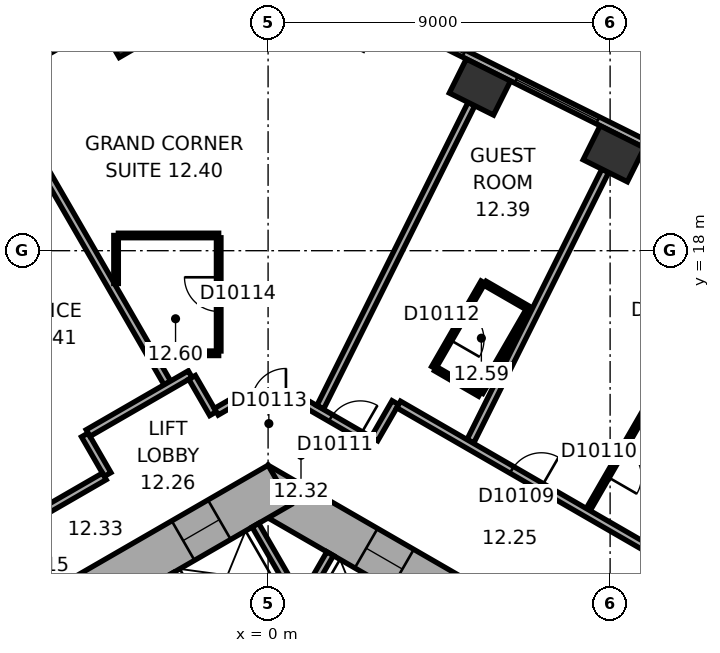
"""IFC4 building model, lengths in metres.
Left out: names, types, materials, properties, quantities, classifications, styles, units other than length and angle.
Written with IfcOpenShell. Run it as: python <this file> out.ifc"""

import sys

from ifc_helpers import new_model, si_unit, direction, frame, frame_2d, origin, origin_2d, place, context, subcontext, project, spatial, rectangle, extrude, element, fill, save


model = new_model("IFC4")
c1 = context("Model", 3, precision=1e-05, world=origin(), true_north=direction((0.0, 1.0)))
c2 = subcontext(c1, "Body", "Model", "MODEL_VIEW")
j1 = project(units=[si_unit("LENGTHUNIT", "METRE"), si_unit("PLANEANGLEUNIT", "RADIAN")], contexts=[c1])
p1 = place(None, origin())
s1 = spatial("IfcSite", under=j1, at=p1, CompositionType="ELEMENT")
p2 = place(p1, origin())
s2 = spatial("IfcBuilding", under=s1, at=p2, CompositionType="ELEMENT")
p3 = place(p2, frame((0.0, 0.0, 60.5)))
s3 = spatial("IfcBuildingStorey", under=s2, at=p3, CompositionType="ELEMENT", Elevation=60.5)
for number, where, z_axis, x_axis in (
    (1, (9.095, 20.551, 0.0), (0.0, 0.0, 1.0), (-0.895, 0.446, 0.0)),
    (2, (5.574, 22.306, 0.0), (0.0, 0.0, 1.0), (-0.895, 0.446, 0.0)),
):
    element("IfcColumn", number, at=place(p3, frame(where, z_axis=z_axis, x_axis=x_axis)), inside=s3, PredefinedType="COLUMN", context=c2, shape_type="SweptSolid", body=[
        extrude(rectangle(XDim=1.3, YDim=1.0, at=origin_2d()), origin(), (0.0, 0.0, 1.0), 3.3),
    ])
p4 = place(p3, frame((-3.518, 23.892, 0.0), z_axis=(0.0, 0.0, 1.0), x_axis=(-0.866025403784, -0.5, 0.0)))
e3 = element("IfcColumn", 3, at=p4, inside=s3, PredefinedType="COLUMN", context=c2, shape_type="SweptSolid", body=[
    extrude(rectangle(XDim=1.5, YDim=1.0, at=origin_2d()), origin(), (0.0, 0.0, 1.0), 3.3),
])
p5 = place(p3, frame((10.4, 5.658, 0.0), z_axis=(0.0, 0.0, 1.0), x_axis=(-0.866021384402, 0.500006961711, 0.0)))
e4 = element("IfcWall", 4, at=p5, inside=s3, PredefinedType="SHEAR", context=c2, shape_type="SweptSolid", body=[
    extrude(rectangle(XDim=12.355, YDim=1.2, at=frame_2d((6.178, 0.0))), origin(), (0.0, 0.0, 1.0), 3.3),
])
p6 = place(p5, frame((2.728, 0.0, 0.0)))
e5 = element("IfcOpeningElement", 5, at=p6, cuts=e4, PredefinedType="OPENING", context=c2, shape_type="SweptSolid", body=[
    extrude(rectangle(XDim=1.1, YDim=2.1, at=frame_2d((0.55, 1.05))), frame((0.0, 0.61, 0.0), z_axis=(0.0, -1.0, 0.0), x_axis=(1.0, 0.0, 0.0)), (0.0, 0.0, 1.0), 1.22),
])
p7 = place(p5, frame((5.328, 0.0, 0.0)))
e6 = element("IfcOpeningElement", 6, at=p7, cuts=e4, PredefinedType="OPENING", context=c2, shape_type="SweptSolid", body=[
    extrude(rectangle(XDim=1.1, YDim=2.1, at=frame_2d((0.55, 1.05))), frame((0.0, 0.61, 0.0), z_axis=(0.0, -1.0, 0.0), x_axis=(1.0, 0.0, 0.0)), (0.0, 0.0, 1.0), 1.22),
])
p8 = place(p5, frame((7.928, 0.0, 0.0)))
e7 = element("IfcOpeningElement", 7, at=p8, cuts=e4, PredefinedType="OPENING", context=c2, shape_type="SweptSolid", body=[
    extrude(rectangle(XDim=1.1, YDim=2.1, at=frame_2d((0.55, 1.05))), frame((0.0, 0.61, 0.0), z_axis=(0.0, -1.0, 0.0), x_axis=(1.0, 0.0, 0.0)), (0.0, 0.0, 1.0), 1.22),
])
p9 = place(p3, frame((0.3, 11.836, 0.0), z_axis=(0.0, 0.0, 1.0), x_axis=(-0.866021384402, -0.500006961711, 0.0)))
e8 = element("IfcWall", 8, at=p9, inside=s3, PredefinedType="SHEAR", context=c2, shape_type="SweptSolid", body=[
    extrude(rectangle(XDim=12.355, YDim=1.2, at=frame_2d((6.178, 0.0))), origin(), (0.0, 0.0, 1.0), 3.3),
])
p10 = place(p9, frame((6.378, 0.0, 0.0)))
e9 = element("IfcOpeningElement", 9, at=p10, cuts=e8, PredefinedType="OPENING", context=c2, shape_type="SweptSolid", body=[
    extrude(rectangle(XDim=1.5, YDim=2.1, at=frame_2d((0.75, 1.05))), frame((0.0, 0.61, 0.0), z_axis=(0.0, -1.0, 0.0), x_axis=(1.0, 0.0, 0.0)), (0.0, 0.0, 1.0), 1.22),
])
p11 = place(p9, frame((1.828, 0.0, 0.0)))
e10 = element("IfcOpeningElement", 10, at=p11, cuts=e8, PredefinedType="OPENING", context=c2, shape_type="SweptSolid", body=[
    extrude(rectangle(XDim=1.1, YDim=2.1, at=frame_2d((0.55, 1.05))), frame((0.0, 0.61, 0.0), z_axis=(0.0, -1.0, 0.0), x_axis=(1.0, 0.0, 0.0)), (0.0, 0.0, 1.0), 1.22),
])
p12 = place(p3, frame((20.63, 15.47, 0.0), z_axis=(0.0, 0.0, 1.0), x_axis=(-0.894934518609, 0.446197498203, 0.0)))
e11 = element("IfcWall", 11, at=p12, inside=s3, PredefinedType="STANDARD", context=c2, shape_type="SweptSolid", body=[
    extrude(rectangle(XDim=21.246, YDim=0.2, at=frame_2d((10.623, 0.0))), origin(), (0.0, 0.0, 1.0), 3.3),
])
p13 = place(p12, frame((1.553, 0.0, 0.8)))
e12 = element("IfcOpeningElement", 12, at=p13, cuts=e11, PredefinedType="OPENING", context=c2, shape_type="SweptSolid", body=[
    extrude(rectangle(XDim=2.4, YDim=1.7, at=frame_2d((1.2, 0.85))), frame((0.0, 0.11, 0.0), z_axis=(0.0, -1.0, 0.0), x_axis=(1.0, 0.0, 0.0)), (0.0, 0.0, 1.0), 0.22),
])
p14 = place(p12, frame((5.488, 0.0, 0.8)))
e13 = element("IfcOpeningElement", 13, at=p14, cuts=e11, PredefinedType="OPENING", context=c2, shape_type="SweptSolid", body=[
    extrude(rectangle(XDim=2.4, YDim=1.7, at=frame_2d((1.2, 0.85))), frame((0.0, 0.11, 0.0), z_axis=(0.0, -1.0, 0.0), x_axis=(1.0, 0.0, 0.0)), (0.0, 0.0, 1.0), 0.22),
])
p15 = place(p12, frame((9.422, 0.0, 0.8)))
e14 = element("IfcOpeningElement", 14, at=p15, cuts=e11, PredefinedType="OPENING", context=c2, shape_type="SweptSolid", body=[
    extrude(rectangle(XDim=2.4, YDim=1.7, at=frame_2d((1.2, 0.85))), frame((0.0, 0.11, 0.0), z_axis=(0.0, -1.0, 0.0), x_axis=(1.0, 0.0, 0.0)), (0.0, 0.0, 1.0), 0.22),
])
p16 = place(p12, frame((13.357, 0.0, 0.8)))
e15 = element("IfcOpeningElement", 15, at=p16, cuts=e11, PredefinedType="OPENING", context=c2, shape_type="SweptSolid", body=[
    extrude(rectangle(XDim=2.4, YDim=1.7, at=frame_2d((1.2, 0.85))), frame((0.0, 0.11, 0.0), z_axis=(0.0, -1.0, 0.0), x_axis=(1.0, 0.0, 0.0)), (0.0, 0.0, 1.0), 0.22),
])
p17 = place(p12, frame((17.292, 0.0, 0.8)))
e16 = element("IfcOpeningElement", 16, at=p17, cuts=e11, PredefinedType="OPENING", context=c2, shape_type="SweptSolid", body=[
    extrude(rectangle(XDim=2.4, YDim=1.7, at=frame_2d((1.2, 0.85))), frame((0.0, 0.11, 0.0), z_axis=(0.0, -1.0, 0.0), x_axis=(1.0, 0.0, 0.0)), (0.0, 0.0, 1.0), 0.22),
])
p18 = place(p3, frame((-3.136, 24.805, 0.0), z_axis=(0.0, 0.0, 1.0), x_axis=(-0.866028291626, -0.499994998079, 0.0)))
e17 = element("IfcWall", 17, at=p18, inside=s3, PredefinedType="STANDARD", context=c2, shape_type="SweptSolid", body=[
    extrude(rectangle(XDim=21.246, YDim=0.2, at=frame_2d((10.623, 0.0))), origin(), (0.0, 0.0, 1.0), 3.3),
])
p19 = place(p18, frame((1.555, 0.0, 0.8)))
e18 = element("IfcOpeningElement", 18, at=p19, cuts=e17, PredefinedType="OPENING", context=c2, shape_type="SweptSolid", body=[
    extrude(rectangle(XDim=2.4, YDim=1.7, at=frame_2d((1.2, 0.85))), frame((0.0, 0.11, 0.0), z_axis=(0.0, -1.0, 0.0), x_axis=(1.0, 0.0, 0.0)), (0.0, 0.0, 1.0), 0.22),
])
p20 = place(p18, frame((5.489, 0.0, 0.8)))
e19 = element("IfcOpeningElement", 19, at=p20, cuts=e17, PredefinedType="OPENING", context=c2, shape_type="SweptSolid", body=[
    extrude(rectangle(XDim=2.4, YDim=1.7, at=frame_2d((1.2, 0.85))), frame((0.0, 0.11, 0.0), z_axis=(0.0, -1.0, 0.0), x_axis=(1.0, 0.0, 0.0)), (0.0, 0.0, 1.0), 0.22),
])
p21 = place(p18, frame((9.424, 0.0, 0.8)))
e20 = element("IfcOpeningElement", 20, at=p21, cuts=e17, PredefinedType="OPENING", context=c2, shape_type="SweptSolid", body=[
    extrude(rectangle(XDim=2.4, YDim=1.7, at=frame_2d((1.2, 0.85))), frame((0.0, 0.11, 0.0), z_axis=(0.0, -1.0, 0.0), x_axis=(1.0, 0.0, 0.0)), (0.0, 0.0, 1.0), 0.22),
])
p22 = place(p18, frame((13.358, 0.0, 0.8)))
e21 = element("IfcOpeningElement", 21, at=p22, cuts=e17, PredefinedType="OPENING", context=c2, shape_type="SweptSolid", body=[
    extrude(rectangle(XDim=2.4, YDim=1.7, at=frame_2d((1.2, 0.85))), frame((0.0, 0.11, 0.0), z_axis=(0.0, -1.0, 0.0), x_axis=(1.0, 0.0, 0.0)), (0.0, 0.0, 1.0), 0.22),
])
p23 = place(p18, frame((17.293, 0.0, 0.8)))
e22 = element("IfcOpeningElement", 22, at=p23, cuts=e17, PredefinedType="OPENING", context=c2, shape_type="SweptSolid", body=[
    extrude(rectangle(XDim=2.4, YDim=1.7, at=frame_2d((1.2, 0.85))), frame((0.0, 0.11, 0.0), z_axis=(0.0, -1.0, 0.0), x_axis=(1.0, 0.0, 0.0)), (0.0, 0.0, 1.0), 0.22),
])
p24 = place(p3, frame((0.532, 8.122, 0.0), z_axis=(0.0, 0.0, 1.0), x_axis=(0.500077893725, 0.86598042715, 0.0)))
e23 = element("IfcWall", 23, at=p24, inside=s3, PredefinedType="PARTITIONING", context=c2, shape_type="SweptSolid", body=[
    extrude(rectangle(XDim=2.2, YDim=0.2, at=frame_2d((1.1, 0.0))), origin(), (0.0, 0.0, 1.0), 3.05),
])
p25 = place(p3, frame((0.767, 8.872, 0.0), z_axis=(0.0, 0.0, 1.0), x_axis=(-0.499994660107, 0.866028486751, 0.0)))
e24 = element("IfcWall", 24, at=p25, inside=s3, PredefinedType="PARTITIONING", context=c2, shape_type="SweptSolid", body=[
    extrude(rectangle(XDim=2.2, YDim=0.2, at=frame_2d((1.1, 0.0))), origin(), (0.0, 0.0, 1.0), 3.05),
])
p26 = place(p3, frame((-1.485, 7.572, 0.0), z_axis=(0.0, 0.0, 1.0), x_axis=(-0.50002983664, 0.866008176907, 0.0)))
e25 = element("IfcWall", 25, at=p26, inside=s3, PredefinedType="PARTITIONING", context=c2, shape_type="SweptSolid", body=[
    extrude(rectangle(XDim=2.2, YDim=0.2, at=frame_2d((1.1, 0.0))), origin(), (0.0, 0.0, 1.0), 3.05),
])
p27 = place(p3, frame((-6.676, 21.492, 0.0), z_axis=(0.0, 0.0, 1.0), x_axis=(0.500011263043, -0.866018900966, 0.0)))
e26 = element("IfcWall", 26, at=p27, inside=s3, PredefinedType="PARTITIONING", context=c2, shape_type="SweptSolid", body=[
    extrude(rectangle(XDim=8.049, YDim=0.2, at=frame_2d((4.024, 0.0))), origin(), (0.0, 0.0, 1.0), 3.05),
])
p28 = place(p3, frame((-4.823, 13.152, 0.0), z_axis=(0.0, 0.0, 1.0), x_axis=(0.499986357472, -0.866033280158, 0.0)))
e27 = element("IfcWall", 27, at=p28, inside=s3, PredefinedType="PARTITIONING", context=c2, shape_type="SweptSolid", body=[
    extrude(rectangle(XDim=1.201, YDim=0.2, at=frame_2d((0.601, 0.0))), origin(), (0.0, 0.0, 1.0), 3.05),
])
p29 = place(p3, frame((-4.309, 12.061, 0.0), z_axis=(0.0, 0.0, 1.0), x_axis=(-0.866020679205, -0.500008183122, 0.0)))
e28 = element("IfcWall", 28, at=p29, inside=s3, PredefinedType="PARTITIONING", context=c2, shape_type="SweptSolid", body=[
    extrude(rectangle(XDim=5.104, YDim=0.2, at=frame_2d((2.552, 0.0))), origin(), (0.0, 0.0, 1.0), 3.05),
])
p30 = place(p29, frame((2.052, 0.0, 0.0)))
e29 = element("IfcOpeningElement", 29, at=p30, cuts=e28, PredefinedType="OPENING", context=c2, shape_type="SweptSolid", body=[
    extrude(rectangle(XDim=1.0, YDim=2.1, at=frame_2d((0.5, 1.05))), frame((0.0, 0.11, 0.0), z_axis=(0.0, -1.0, 0.0), x_axis=(1.0, 0.0, 0.0)), (0.0, 0.0, 1.0), 0.22),
])
p31 = place(p3, frame((-4.0, 17.137, 0.0), z_axis=(0.0, 0.0, 1.0), x_axis=(0.0, 1.0, 0.0)))
e30 = element("IfcWall", 30, at=p31, inside=s3, PredefinedType="PARTITIONING", context=c2, shape_type="SweptSolid", body=[
    extrude(rectangle(XDim=1.263, YDim=0.12, at=frame_2d((0.632, 0.0))), origin(), (0.0, 0.0, 1.0), 3.05),
])
p32 = place(p3, frame((-3.94, 18.401, 0.0), z_axis=(0.0, 0.0, 1.0), x_axis=(1.0, 0.0, 0.0)))
e31 = element("IfcWall", 31, at=p32, inside=s3, PredefinedType="PARTITIONING", context=c2, shape_type="SweptSolid", body=[
    extrude(rectangle(XDim=2.64, YDim=0.12, at=frame_2d((1.32, 0.0))), origin(), (0.0, 0.0, 1.0), 3.05),
])
p33 = place(p3, frame((-2.05, 14.752, 0.0), z_axis=(0.0, 0.0, 1.0), x_axis=(-0.866030936828, -0.499990416364, 0.0)))
e32 = element("IfcWall", 32, at=p33, inside=s3, PredefinedType="PARTITIONING", context=c2, shape_type="SweptSolid", body=[
    extrude(rectangle(XDim=3.102, YDim=0.2, at=frame_2d((1.551, 0.0))), origin(), (0.0, 0.0, 1.0), 3.05),
])
p34 = place(p3, frame((-1.449, 13.712, 0.0), z_axis=(0.0, 0.0, 1.0), x_axis=(-0.499978356969, 0.866037899034, 0.0)))
e33 = element("IfcWall", 33, at=p34, inside=s3, PredefinedType="PARTITIONING", context=c2, shape_type="SweptSolid", body=[
    extrude(rectangle(XDim=1.101, YDim=0.2, at=frame_2d((0.551, 0.0))), origin(), (0.0, 0.0, 1.0), 3.05),
])
p35 = place(p3, frame((-1.3, 15.301, 0.0), z_axis=(0.0, 0.0, 1.0), x_axis=(-1.0, 0.0, 0.0)))
e34 = element("IfcWall", 34, at=p35, inside=s3, PredefinedType="PARTITIONING", context=c2, shape_type="SweptSolid", body=[
    extrude(rectangle(XDim=1.661, YDim=0.12, at=frame_2d((0.831, 0.0))), origin(), (0.0, 0.0, 1.0), 3.05),
])
p36 = place(p3, frame((-1.3, 18.341, 0.0), z_axis=(0.0, 0.0, 1.0), x_axis=(0.0, -1.0, 0.0)))
e35 = element("IfcWall", 35, at=p36, inside=s3, PredefinedType="PARTITIONING", context=c2, shape_type="SweptSolid", body=[
    extrude(rectangle(XDim=2.98, YDim=0.12, at=frame_2d((1.49, 0.0))), origin(), (0.0, 0.0, 1.0), 3.05),
])
p37 = place(p36, frame((1.04, 0.0, 0.0)))
e36 = element("IfcOpeningElement", 36, at=p37, cuts=e35, PredefinedType="OPENING", context=c2, shape_type="SweptSolid", body=[
    extrude(rectangle(XDim=0.9, YDim=2.1, at=frame_2d((0.45, 1.05))), frame((0.0, 0.07, 0.0), z_axis=(0.0, -1.0, 0.0), x_axis=(1.0, 0.0, 0.0)), (0.0, 0.0, 1.0), 0.14),
])
p38 = place(p3, frame((-0.95, 14.001, 0.0), z_axis=(0.0, 0.0, 1.0), x_axis=(-0.86609177584, -0.499885022602, 0.0)))
e37 = element("IfcWall", 37, at=p38, inside=s3, PredefinedType="PARTITIONING", context=c2, shape_type="SweptSolid", body=[
    extrude(rectangle(XDim=0.477, YDim=0.2, at=frame_2d((0.238, 0.0))), origin(), (0.0, 0.0, 1.0), 3.05),
])
p39 = place(p3, frame((0.95, 14.001, 0.0), z_axis=(0.0, 0.0, 1.0), x_axis=(-1.0, 0.0, 0.0)))
e38 = element("IfcWall", 38, at=p39, inside=s3, PredefinedType="PARTITIONING", context=c2, shape_type="SweptSolid", body=[
    extrude(rectangle(XDim=1.86, YDim=0.2, at=frame_2d((0.93, 0.0))), origin(), (0.0, 0.0, 1.0), 3.05),
])
p40 = place(p39, frame((0.48, 0.0, 0.0)))
e39 = element("IfcOpeningElement", 39, at=p40, cuts=e38, PredefinedType="OPENING", context=c2, shape_type="SweptSolid", body=[
    extrude(rectangle(XDim=0.9, YDim=2.1, at=frame_2d((0.45, 1.05))), frame((0.0, 0.11, 0.0), z_axis=(0.0, -1.0, 0.0), x_axis=(1.0, 0.0, 0.0)), (0.0, 0.0, 1.0), 0.22),
])
p41 = place(p3, frame((2.748, 12.962, 0.0), z_axis=(0.0, 0.0, 1.0), x_axis=(-0.866013897511, 0.50001992892, 0.0)))
e40 = element("IfcWall", 40, at=p41, inside=s3, PredefinedType="PARTITIONING", context=c2, shape_type="SweptSolid", body=[
    extrude(rectangle(XDim=2.037, YDim=0.2, at=frame_2d((1.018, 0.0))), origin(), (0.0, 0.0, 1.0), 3.05),
])
p42 = place(p41, frame((0.372, 0.0, 0.0)))
e41 = element("IfcOpeningElement", 41, at=p42, cuts=e40, PredefinedType="OPENING", context=c2, shape_type="SweptSolid", body=[
    extrude(rectangle(XDim=0.9, YDim=2.1, at=frame_2d((0.45, 1.05))), frame((0.0, 0.11, 0.0), z_axis=(0.0, -1.0, 0.0), x_axis=(1.0, 0.0, 0.0)), (0.0, 0.0, 1.0), 0.22),
])
p43 = place(p3, frame((3.349, 14.002, 0.0), z_axis=(0.0, 0.0, 1.0), x_axis=(-0.500074377092, -0.865982457891, 0.0)))
e42 = element("IfcWall", 42, at=p43, inside=s3, PredefinedType="PARTITIONING", context=c2, shape_type="SweptSolid", body=[
    extrude(rectangle(XDim=1.101, YDim=0.2, at=frame_2d((0.55, 0.0))), origin(), (0.0, 0.0, 1.0), 3.05),
])
p44 = place(p3, frame((4.356, 14.922, 0.0), z_axis=(0.0, 0.0, 1.0), x_axis=(0.499936506574, 0.866062058628, 0.0)))
e43 = element("IfcWall", 43, at=p44, inside=s3, PredefinedType="PARTITIONING", context=c2, shape_type="SweptSolid", body=[
    extrude(rectangle(XDim=2.6, YDim=0.12, at=frame_2d((1.3, 0.0))), origin(), (0.0, 0.0, 1.0), 3.05),
])
p45 = place(p44, frame((0.85, 0.0, 0.0)))
e44 = element("IfcOpeningElement", 44, at=p45, cuts=e43, PredefinedType="OPENING", context=c2, shape_type="SweptSolid", body=[
    extrude(rectangle(XDim=0.9, YDim=2.1, at=frame_2d((0.45, 1.05))), frame((0.0, 0.07, 0.0), z_axis=(0.0, -1.0, 0.0), x_axis=(1.0, 0.0, 0.0)), (0.0, 0.0, 1.0), 0.14),
])
p46 = place(p3, frame((5.351, 21.859, 0.0), z_axis=(0.0, 0.0, 1.0), x_axis=(-0.446205309328, -0.894930624086, 0.0)))
e45 = element("IfcWall", 45, at=p46, inside=s3, PredefinedType="PARTITIONING", context=c2, shape_type="SweptSolid", body=[
    extrude(rectangle(XDim=8.913, YDim=0.2, at=frame_2d((4.457, 0.0))), origin(), (0.0, 0.0, 1.0), 2.6),
])
p47 = place(p3, frame((5.569, 14.222, 0.0), z_axis=(0.0, 0.0, 1.0), x_axis=(-0.866036909293, 0.499980071345, 0.0)))
e46 = element("IfcWall", 46, at=p47, inside=s3, PredefinedType="PARTITIONING", context=c2, shape_type="SweptSolid", body=[
    extrude(rectangle(XDim=1.34, YDim=0.12, at=frame_2d((0.67, 0.0))), origin(), (0.0, 0.0, 1.0), 3.05),
])
p48 = place(p3, frame((5.708, 17.144, 0.0), z_axis=(0.0, 0.0, 1.0), x_axis=(0.866082447003, -0.499901185229, 0.0)))
e47 = element("IfcWall", 47, at=p48, inside=s3, PredefinedType="PARTITIONING", context=c2, shape_type="SweptSolid", body=[
    extrude(rectangle(XDim=1.34, YDim=0.12, at=frame_2d((0.67, 0.0))), origin(), (0.0, 0.0, 1.0), 3.05),
])
p49 = place(p3, frame((6.839, 16.422, 0.0), z_axis=(0.0, 0.0, 1.0), x_axis=(-0.50000366821, -0.866023285932, 0.0)))
e48 = element("IfcWall", 48, at=p49, inside=s3, PredefinedType="PARTITIONING", context=c2, shape_type="SweptSolid", body=[
    extrude(rectangle(XDim=2.48, YDim=0.12, at=frame_2d((1.24, 0.0))), origin(), (0.0, 0.0, 1.0), 3.05),
])
p50 = place(p3, frame((8.424, 11.188, 0.0), z_axis=(0.0, 0.0, 1.0), x_axis=(0.49995078051, 0.866053818805, 0.0)))
e49 = element("IfcWall", 49, at=p50, inside=s3, PredefinedType="PARTITIONING", context=c2, shape_type="SweptSolid", body=[
    extrude(rectangle(XDim=2.9, YDim=0.12, at=frame_2d((1.45, 0.0))), origin(), (0.0, 0.0, 1.0), 3.05),
])
p51 = place(p50, frame((1.0, 0.0, 0.0)))
e50 = element("IfcOpeningElement", 50, at=p51, cuts=e49, PredefinedType="OPENING", context=c2, shape_type="SweptSolid", body=[
    extrude(rectangle(XDim=0.9, YDim=2.1, at=frame_2d((0.45, 1.05))), frame((0.0, 0.07, 0.0), z_axis=(0.0, -1.0, 0.0), x_axis=(1.0, 0.0, 0.0)), (0.0, 0.0, 1.0), 0.14),
])
p52 = place(p3, frame((8.872, 20.104, 0.0), z_axis=(0.0, 0.0, 1.0), x_axis=(-0.446218378653, -0.894924107706, 0.0)))
e51 = element("IfcWall", 51, at=p52, inside=s3, PredefinedType="PARTITIONING", context=c2, shape_type="SweptSolid", body=[
    extrude(rectangle(XDim=7.95, YDim=0.2, at=frame_2d((3.975, 0.0))), origin(), (0.0, 0.0, 1.0), 3.05),
])
p53 = place(p3, frame((10.972, 9.602, 0.0), z_axis=(0.0, 0.0, 1.0), x_axis=(-0.866033277307, 0.499986362411, 0.0)))
e52 = element("IfcWall", 52, at=p53, inside=s3, PredefinedType="PARTITIONING", context=c2, shape_type="SweptSolid", body=[
    extrude(rectangle(XDim=8.702, YDim=0.2, at=frame_2d((4.351, 0.0))), origin(), (0.0, 0.0, 1.0), 3.05),
])
p54 = place(p53, frame((4.364, 0.0, 0.0)))
e53 = element("IfcOpeningElement", 53, at=p54, cuts=e52, PredefinedType="OPENING", context=c2, shape_type="SweptSolid", body=[
    extrude(rectangle(XDim=0.9, YDim=2.1, at=frame_2d((0.45, 1.05))), frame((0.0, 0.11, 0.0), z_axis=(0.0, -1.0, 0.0), x_axis=(1.0, 0.0, 0.0)), (0.0, 0.0, 1.0), 0.22),
])
p55 = place(p16, origin())
e54 = element("IfcWindow", 54, at=p55, inside=s3, PartitioningType="SINGLE_PANEL", PredefinedType="WINDOW", context=c2, shape_type="SweptSolid", body=[
    extrude(rectangle(XDim=2.4, YDim=1.7, at=frame_2d((1.2, 0.85))), frame((0.0, 0.03, 0.0), z_axis=(0.0, -1.0, 0.0), x_axis=(1.0, 0.0, 0.0)), (0.0, 0.0, 1.0), 0.06),
])
fill(e15, e54)
p56 = place(p17, origin())
e55 = element("IfcWindow", 55, at=p56, inside=s3, PartitioningType="SINGLE_PANEL", PredefinedType="WINDOW", context=c2, shape_type="SweptSolid", body=[
    extrude(rectangle(XDim=2.4, YDim=1.7, at=frame_2d((1.2, 0.85))), frame((0.0, 0.03, 0.0), z_axis=(0.0, -1.0, 0.0), x_axis=(1.0, 0.0, 0.0)), (0.0, 0.0, 1.0), 0.06),
])
fill(e16, e55)
p57 = place(p19, origin())
e56 = element("IfcWindow", 56, at=p57, inside=s3, PartitioningType="SINGLE_PANEL", PredefinedType="WINDOW", context=c2, shape_type="SweptSolid", body=[
    extrude(rectangle(XDim=2.4, YDim=1.7, at=frame_2d((1.2, 0.85))), frame((0.0, 0.03, 0.0), z_axis=(0.0, -1.0, 0.0), x_axis=(1.0, 0.0, 0.0)), (0.0, 0.0, 1.0), 0.06),
])
fill(e18, e56)
p58 = place(p8, origin())
e57 = element("IfcDoor", 57, at=p58, inside=s3, OperationType="DOUBLE_DOOR_SLIDING", PredefinedType="DOOR", context=c2, shape_type="SweptSolid", body=[
    extrude(rectangle(XDim=1.1, YDim=2.1, at=frame_2d((0.55, 1.05))), frame((0.0, 0.025, 0.0), z_axis=(0.0, -1.0, 0.0), x_axis=(1.0, 0.0, 0.0)), (0.0, 0.0, 1.0), 0.05),
])
fill(e7, e57)
p59 = place(p11, origin())
e58 = element("IfcDoor", 58, at=p59, inside=s3, OperationType="DOUBLE_DOOR_SLIDING", PredefinedType="DOOR", context=c2, shape_type="SweptSolid", body=[
    extrude(rectangle(XDim=1.1, YDim=2.1, at=frame_2d((0.55, 1.05))), frame((0.0, 0.025, 0.0), z_axis=(0.0, -1.0, 0.0), x_axis=(1.0, 0.0, 0.0)), (0.0, 0.0, 1.0), 0.05),
])
fill(e10, e58)
p60 = place(p54, origin())
e59 = element("IfcDoor", 59, at=p60, inside=s3, OperationType="SINGLE_SWING_LEFT", PredefinedType="DOOR", context=c2, shape_type="SweptSolid", body=[
    extrude(rectangle(XDim=0.9, YDim=2.1, at=frame_2d((0.45, 1.05))), frame((0.0, 0.025, 0.0), z_axis=(0.0, -1.0, 0.0), x_axis=(1.0, 0.0, 0.0)), (0.0, 0.0, 1.0), 0.05),
])
fill(e53, e59)
p61 = place(p51, origin())
e60 = element("IfcDoor", 60, at=p61, inside=s3, OperationType="SINGLE_SWING_LEFT", PredefinedType="DOOR", context=c2, shape_type="SweptSolid", body=[
    extrude(rectangle(XDim=0.9, YDim=2.1, at=frame_2d((0.45, 1.05))), frame((0.0, 0.025, 0.0), z_axis=(0.0, -1.0, 0.0), x_axis=(1.0, 0.0, 0.0)), (0.0, 0.0, 1.0), 0.05),
])
fill(e50, e60)
p62 = place(p42, origin())
e61 = element("IfcDoor", 61, at=p62, inside=s3, OperationType="SINGLE_SWING_LEFT", PredefinedType="DOOR", context=c2, shape_type="SweptSolid", body=[
    extrude(rectangle(XDim=0.9, YDim=2.1, at=frame_2d((0.45, 1.05))), frame((0.0, 0.025, 0.0), z_axis=(0.0, -1.0, 0.0), x_axis=(1.0, 0.0, 0.0)), (0.0, 0.0, 1.0), 0.05),
])
fill(e41, e61)
p63 = place(p45, origin())
e62 = element("IfcDoor", 62, at=p63, inside=s3, OperationType="SINGLE_SWING_LEFT", PredefinedType="DOOR", context=c2, shape_type="SweptSolid", body=[
    extrude(rectangle(XDim=0.9, YDim=2.1, at=frame_2d((0.45, 1.05))), frame((0.0, 0.025, 0.0), z_axis=(0.0, -1.0, 0.0), x_axis=(1.0, 0.0, 0.0)), (0.0, 0.0, 1.0), 0.05),
])
fill(e44, e62)
p64 = place(p40, origin())
e63 = element("IfcDoor", 63, at=p64, inside=s3, OperationType="SINGLE_SWING_LEFT", PredefinedType="DOOR", context=c2, shape_type="SweptSolid", body=[
    extrude(rectangle(XDim=0.9, YDim=2.1, at=frame_2d((0.45, 1.05))), frame((0.0, 0.025, 0.0), z_axis=(0.0, -1.0, 0.0), x_axis=(1.0, 0.0, 0.0)), (0.0, 0.0, 1.0), 0.05),
])
fill(e39, e63)
p65 = place(p37, origin())
e64 = element("IfcDoor", 64, at=p65, inside=s3, OperationType="SINGLE_SWING_LEFT", PredefinedType="DOOR", context=c2, shape_type="SweptSolid", body=[
    extrude(rectangle(XDim=0.9, YDim=2.1, at=frame_2d((0.45, 1.05))), frame((0.0, 0.025, 0.0), z_axis=(0.0, -1.0, 0.0), x_axis=(1.0, 0.0, 0.0)), (0.0, 0.0, 1.0), 0.05),
])
fill(e36, e64)
save(model, sys.argv[1])
